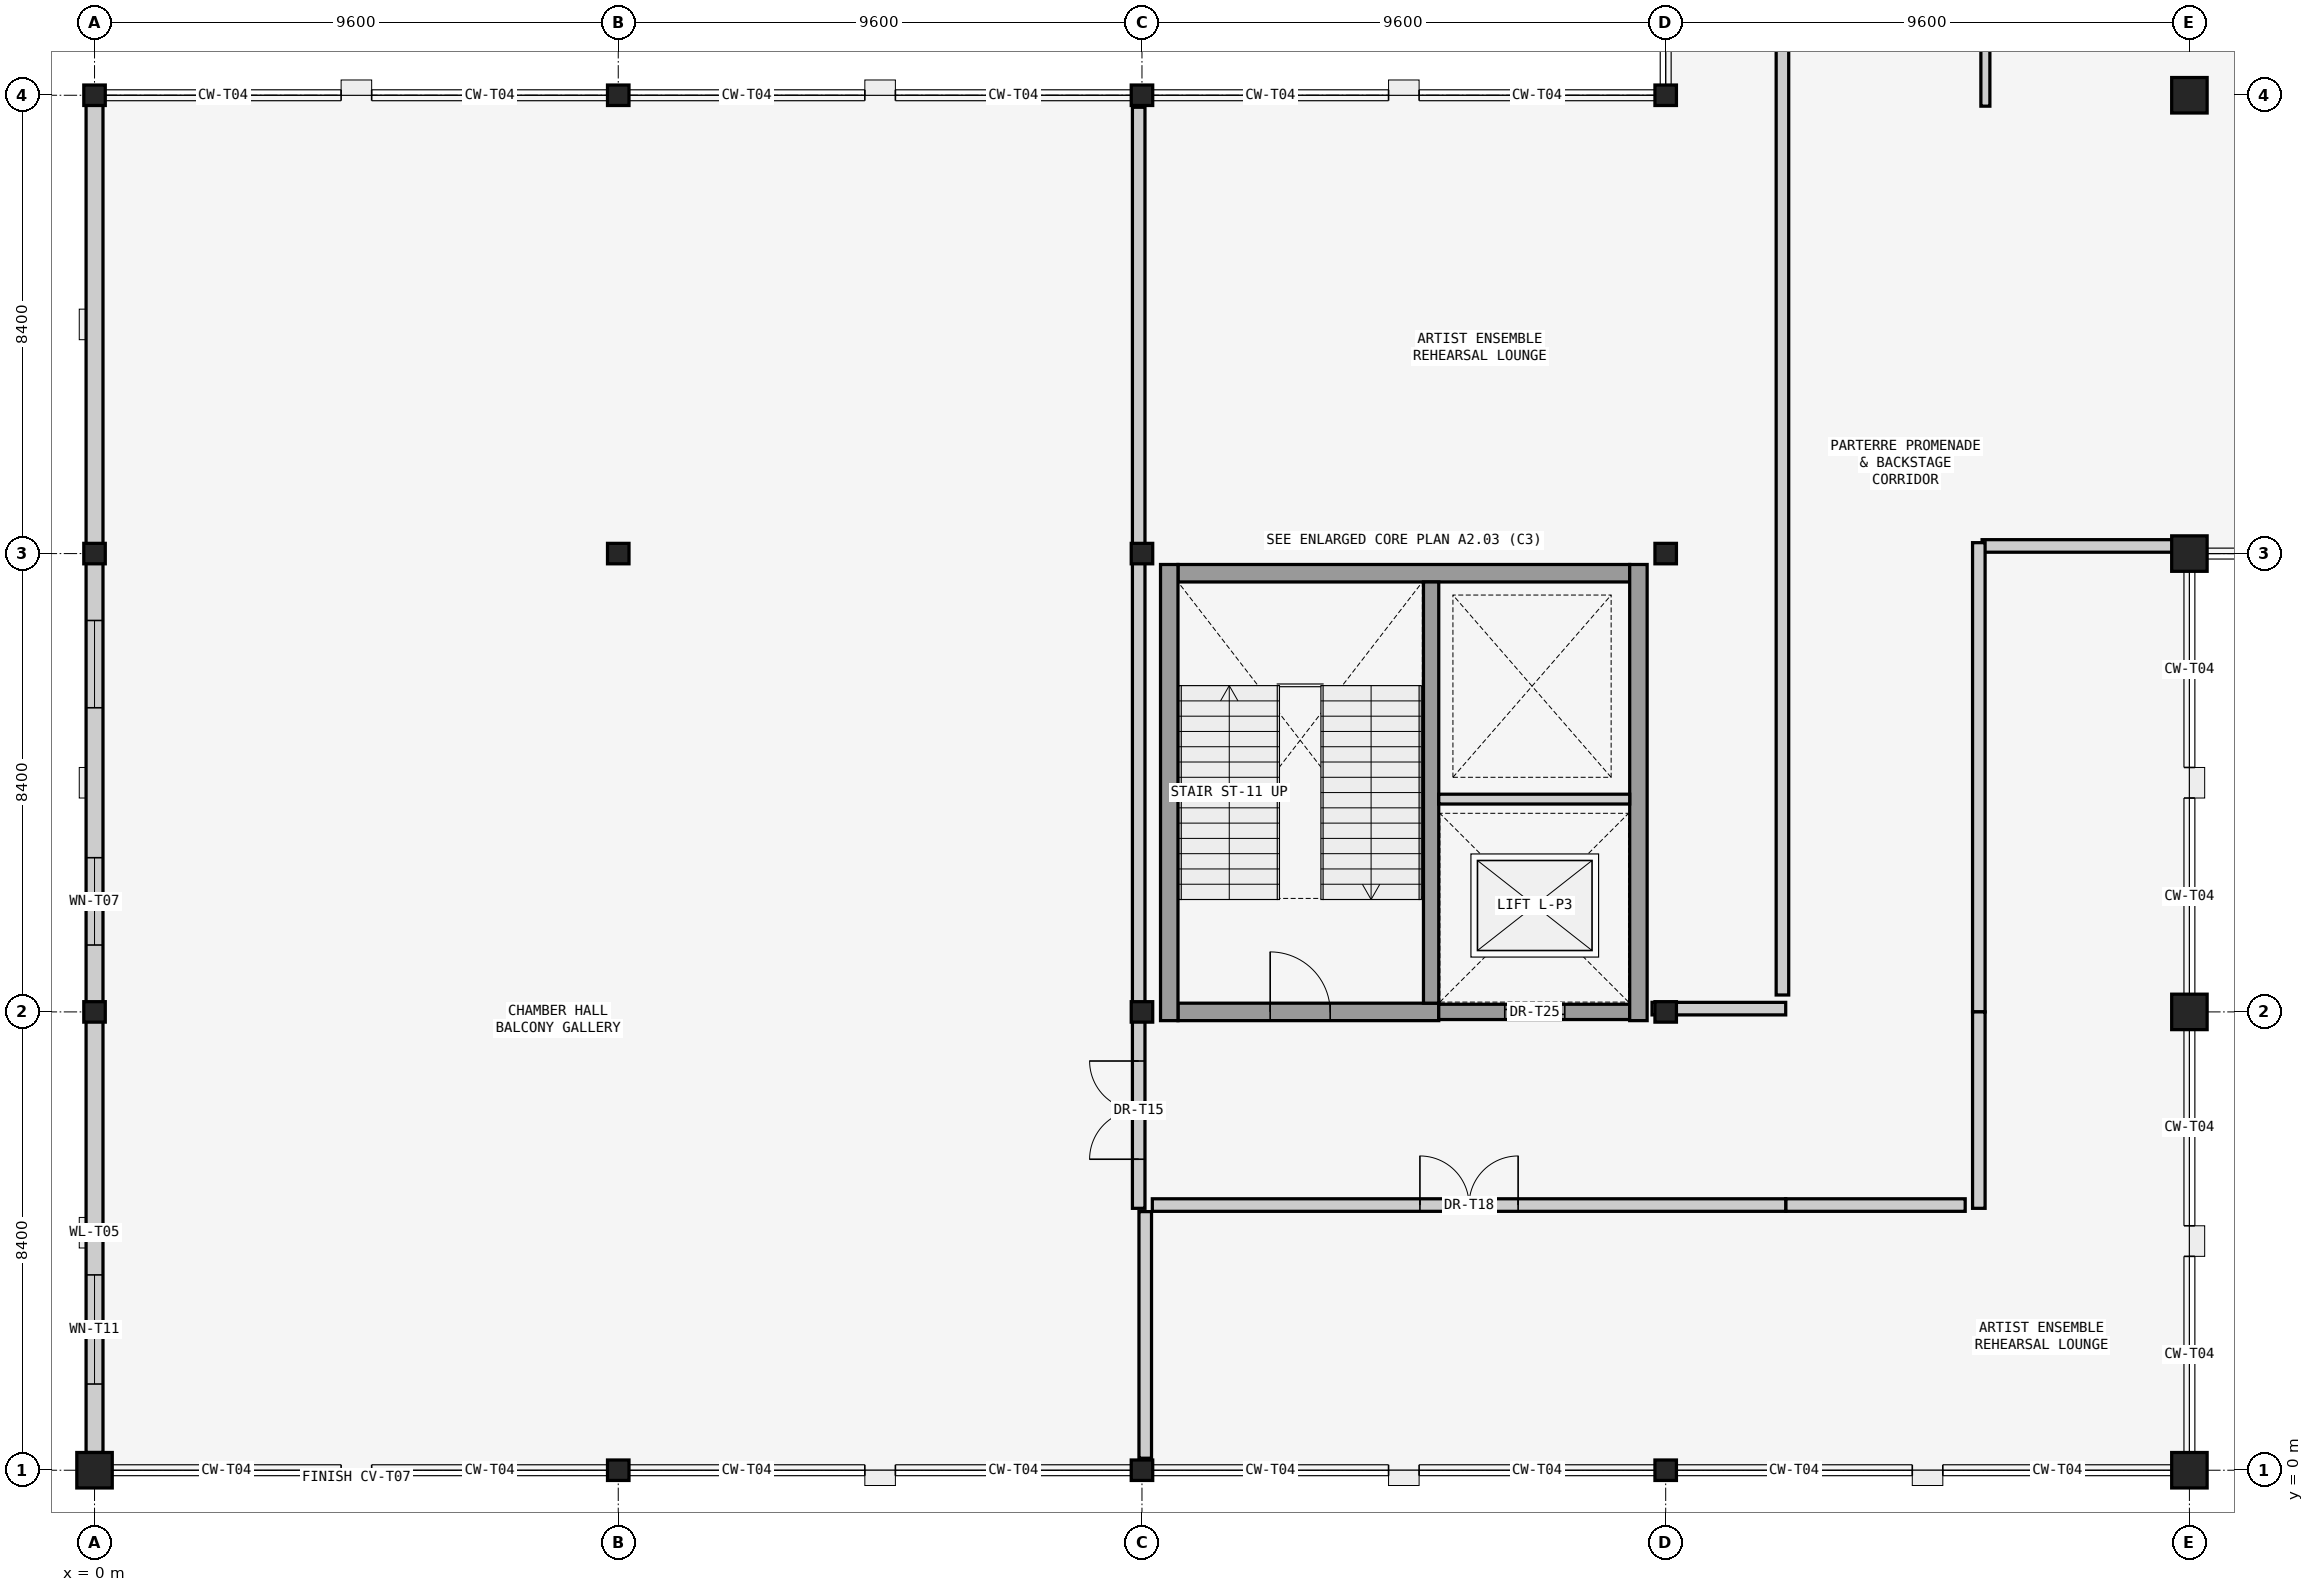
"""IFC4 building model, lengths in metres.
Left out: names, types, materials, properties, quantities, classifications, styles, units other than length and angle.
Written with IfcOpenShell. Run it as: python <this file> out.ifc"""

import sys

from ifc_helpers import new_model, si_unit, direction, frame, frame_2d, origin, origin_with_axes, origin_2d, place, context, subcontext, project, spatial, rectangle, i_section, extrude, element, fill, save


model = new_model("IFC4")
c1 = context("Model", 3, precision=1e-05, world=origin(), true_north=direction((0.0, 1.0)))
c2 = subcontext(c1, "Body", "Model", "MODEL_VIEW")
j1 = project(units=[si_unit("LENGTHUNIT", "METRE"), si_unit("PLANEANGLEUNIT", "RADIAN")], contexts=[c1])
p1 = place(None, origin())
s1 = spatial("IfcSite", under=j1, at=p1, CompositionType="ELEMENT")
p2 = place(p1, origin())
s2 = spatial("IfcBuilding", under=s1, at=p2, CompositionType="ELEMENT")
p3 = place(p2, frame((0.0, 0.0, 5.4)))
s3 = spatial("IfcBuildingStorey", under=s2, at=p3, CompositionType="ELEMENT", Elevation=5.4)
p4 = place(p3, origin_with_axes())
e1 = element("IfcColumn", 1, at=p4, inside=s3, PredefinedType="PILASTER", context=c2, shape_type="SweptSolid", body=[
    extrude(rectangle(XDim=0.65, YDim=0.65, at=origin_2d()), origin(), (0.0, 0.0, 1.0), 4.54),
])
for number, where, z_axis, x_axis in (
    (2, (0.0, 8.4, 0.0), (0.0, 0.0, 1.0), (1.0, 0.0, 0.0)),
    (3, (0.0, 16.8, 0.0), (0.0, 0.0, 1.0), (1.0, 0.0, 0.0)),
    (4, (0.0, 25.2, 0.0), (0.0, 0.0, 1.0), (1.0, 0.0, 0.0)),
    (5, (9.6, 0.0, 0.0), (0.0, 0.0, 1.0), (1.0, 0.0, 0.0)),
    (6, (9.6, 16.8, 0.0), (0.0, 0.0, 1.0), (1.0, 0.0, 0.0)),
    (7, (9.6, 25.2, 0.0), (0.0, 0.0, 1.0), (1.0, 0.0, 0.0)),
    (8, (19.2, 0.0, 0.0), (0.0, 0.0, 1.0), (1.0, 0.0, 0.0)),
    (9, (19.2, 8.4, 0.0), (0.0, 0.0, 1.0), (1.0, 0.0, 0.0)),
    (10, (19.2, 16.8, 0.0), (0.0, 0.0, 1.0), (1.0, 0.0, 0.0)),
    (11, (19.2, 25.2, 0.0), (0.0, 0.0, 1.0), (1.0, 0.0, 0.0)),
    (12, (28.8, 0.0, 0.0), (0.0, 0.0, 1.0), (1.0, 0.0, 0.0)),
    (13, (28.8, 8.4, 0.0), (0.0, 0.0, 1.0), (1.0, 0.0, 0.0)),
    (14, (28.8, 16.8, 0.0), (0.0, 0.0, 1.0), (1.0, 0.0, 0.0)),
):
    element("IfcColumn", number, at=place(p3, frame(where, z_axis=z_axis, x_axis=x_axis)), inside=s3, PredefinedType="COLUMN", context=c2, shape_type="SweptSolid", body=[
        extrude(i_section(OverallWidth=0.394, OverallDepth=0.375, WebThickness=0.021, FlangeThickness=0.033, at=origin_2d()), origin(), (0.0, 0.0, 1.0), 4.54),
    ])
p5 = place(p3, frame((28.8, 25.2, 0.0), z_axis=(0.0, 0.0, 1.0), x_axis=(1.0, 0.0, 0.0)))
e15 = element("IfcColumn", 15, at=p5, inside=s3, PredefinedType="COLUMN", context=c2, shape_type="SweptSolid", body=[
    extrude(i_section(OverallWidth=0.394, OverallDepth=0.375, WebThickness=0.021, FlangeThickness=0.033, at=origin_2d()), origin(), (0.0, 0.0, 1.0), 4.53),
])
for number, where, z_axis, x_axis in (
    (16, (38.4, 0.0, 0.0), (0.0, 0.0, 1.0), (1.0, 0.0, 0.0)),
    (17, (38.4, 8.4, 0.0), (0.0, 0.0, 1.0), (1.0, 0.0, 0.0)),
    (18, (38.4, 16.8, 0.0), (0.0, 0.0, 1.0), (1.0, 0.0, 0.0)),
):
    element("IfcColumn", number, at=place(p3, frame(where, z_axis=z_axis, x_axis=x_axis)), inside=s3, PredefinedType="COLUMN", context=c2, shape_type="SweptSolid", body=[
        extrude(rectangle(XDim=0.65, YDim=0.65, at=origin_2d()), origin(), (0.0, 0.0, 1.0), 4.54),
    ])
p6 = place(p3, frame((38.4, 25.2, 0.0), z_axis=(0.0, 0.0, 1.0), x_axis=(1.0, 0.0, 0.0)))
e19 = element("IfcColumn", 19, at=p6, inside=s3, PredefinedType="COLUMN", context=c2, shape_type="SweptSolid", body=[
    extrude(rectangle(XDim=0.65, YDim=0.65, at=origin_2d()), origin(), (0.0, 0.0, 1.0), 4.53),
])
p7 = place(p3, frame((0.0, 0.325, 0.0), z_axis=(0.0, 0.0, 1.0), x_axis=(0.0, 1.0, 0.0)))
e20 = element("IfcWall", 20, at=p7, inside=s3, PredefinedType="SOLIDWALL", context=c2, shape_type="SweptSolid", body=[
    extrude(rectangle(XDim=8.055, YDim=0.31, at=frame_2d((4.027, 0.0))), origin(), (0.0, 0.0, 1.0), 3.92),
])
p8 = place(p7, frame((1.255, 0.0, 1.05)))
e21 = element("IfcOpeningElement", 21, at=p8, cuts=e20, PredefinedType="OPENING", context=c2, shape_type="SweptSolid", body=[
    extrude(rectangle(XDim=2.0, YDim=1.5, at=frame_2d((1.0, 0.75))), frame((0.0, 0.165, 0.0), z_axis=(0.0, -1.0, 0.0), x_axis=(1.0, 0.0, 0.0)), (0.0, 0.0, 1.0), 0.33),
])
p9 = place(p3, frame((0.0, 8.42, 0.0), z_axis=(0.0, 0.0, 1.0), x_axis=(0.0, 1.0, 0.0)))
e22 = element("IfcWall", 22, at=p9, inside=s3, PredefinedType="SOLIDWALL", context=c2, shape_type="SweptSolid", body=[
    extrude(rectangle(XDim=8.36, YDim=0.31, at=frame_2d((4.18, 0.0))), origin(), (0.0, 0.0, 1.0), 3.92),
])
p10 = place(p9, frame((1.206, 0.0, 0.99)))
e23 = element("IfcOpeningElement", 23, at=p10, cuts=e22, PredefinedType="OPENING", context=c2, shape_type="SweptSolid", body=[
    extrude(rectangle(XDim=1.6, YDim=2.0, at=frame_2d((0.8, 1.0))), frame((0.0, 0.165, 0.0), z_axis=(0.0, -1.0, 0.0), x_axis=(1.0, 0.0, 0.0)), (0.0, 0.0, 1.0), 0.33),
])
p11 = place(p9, frame((5.554, 0.0, 0.99)))
e24 = element("IfcOpeningElement", 24, at=p11, cuts=e22, PredefinedType="OPENING", context=c2, shape_type="SweptSolid", body=[
    extrude(rectangle(XDim=1.6, YDim=2.0, at=frame_2d((0.8, 1.0))), frame((0.0, 0.165, 0.0), z_axis=(0.0, -1.0, 0.0), x_axis=(1.0, 0.0, 0.0)), (0.0, 0.0, 1.0), 0.33),
])
p12 = place(p3, frame((0.0, 16.82, 0.0), z_axis=(0.0, 0.0, 1.0), x_axis=(0.0, 1.0, 0.0)))
e25 = element("IfcWall", 25, at=p12, inside=s3, PredefinedType="SOLIDWALL", context=c2, shape_type="SweptSolid", body=[
    extrude(rectangle(XDim=8.36, YDim=0.31, at=frame_2d((4.18, 0.0))), origin(), (0.0, 0.0, 1.0), 3.92),
])
p13 = place(p3, frame((19.86, 8.4, 0.0), z_axis=(0.0, 0.0, 1.0), x_axis=(1.0, 0.0, 0.0)))
e26 = element("IfcWall", 26, at=p13, inside=s3, PredefinedType="SHEAR", context=c2, shape_type="SweptSolid", body=[
    extrude(rectangle(XDim=4.78, YDim=0.32, at=frame_2d((2.39, 0.0))), origin(), (0.0, 0.0, 1.0), 4.52),
])
p14 = place(p13, frame((1.69, 0.0, 0.0)))
e27 = element("IfcOpeningElement", 27, at=p14, cuts=e26, PredefinedType="OPENING", context=c2, shape_type="SweptSolid", body=[
    extrude(rectangle(XDim=1.1, YDim=2.2, at=frame_2d((0.55, 1.1))), frame((0.0, 0.17, 0.0), z_axis=(0.0, -1.0, 0.0), x_axis=(1.0, 0.0, 0.0)), (0.0, 0.0, 1.0), 0.34),
])
p15 = place(p3, frame((24.64, 8.4, 0.0), z_axis=(0.0, 0.0, 1.0), x_axis=(1.0, 0.0, 0.0)))
e28 = element("IfcWall", 28, at=p15, inside=s3, PredefinedType="SHEAR", context=c2, shape_type="SweptSolid", body=[
    extrude(rectangle(XDim=3.5, YDim=0.28, at=frame_2d((1.75, 0.0))), origin(), (0.0, 0.0, 1.0), 4.52),
])
p16 = place(p15, frame((1.21, 0.0, 0.0)))
e29 = element("IfcOpeningElement", 29, at=p16, cuts=e28, PredefinedType="OPENING", context=c2, shape_type="SweptSolid", body=[
    extrude(rectangle(XDim=1.1, YDim=2.2, at=frame_2d((0.55, 1.1))), frame((0.0, 0.15, 0.0), z_axis=(0.0, -1.0, 0.0), x_axis=(1.0, 0.0, 0.0)), (0.0, 0.0, 1.0), 0.3),
])
p17 = place(p3, frame((28.14, 16.44, 0.0), z_axis=(0.0, 0.0, 1.0), x_axis=(-1.0, 0.0, 0.0)))
e30 = element("IfcWall", 30, at=p17, inside=s3, PredefinedType="SHEAR", context=c2, shape_type="SweptSolid", body=[
    extrude(rectangle(XDim=8.28, YDim=0.32, at=frame_2d((4.14, 0.0))), origin(), (0.0, 0.0, 1.0), 4.52),
])
for number, where, z_axis, x_axis in (
    (31, (19.7, 16.6, 0.0), (0.0, 0.0, 1.0), (0.0, -1.0, 0.0)),
    (32, (28.3, 8.24, 0.0), (0.0, 0.0, 1.0), (0.0, 1.0, 0.0)),
):
    element("IfcWall", number, at=place(p3, frame(where, z_axis=z_axis, x_axis=x_axis)), inside=s3, PredefinedType="SHEAR", context=c2, shape_type="SweptSolid", body=[
        extrude(rectangle(XDim=8.36, YDim=0.32, at=frame_2d((4.18, 0.0))), origin(), (0.0, 0.0, 1.0), 4.52),
    ])
p18 = place(p3, frame((24.5, 8.56, 0.0), z_axis=(0.0, 0.0, 1.0), x_axis=(0.0, 1.0, 0.0)))
e33 = element("IfcWall", 33, at=p18, inside=s3, PredefinedType="SHEAR", context=c2, shape_type="SweptSolid", body=[
    extrude(rectangle(XDim=7.72, YDim=0.28, at=frame_2d((3.86, 0.0))), origin(), (0.0, 0.0, 1.0), 4.52),
])
p19 = place(p3, frame((24.64, 12.3, 0.0), z_axis=(0.0, 0.0, 1.0), x_axis=(1.0, 0.0, 0.0)))
e34 = element("IfcWall", 34, at=p19, inside=s3, PredefinedType="SOLIDWALL", context=c2, shape_type="SweptSolid", body=[
    extrude(rectangle(XDim=3.5, YDim=0.18, at=frame_2d((1.75, 0.0))), origin(), (0.0, 0.0, 1.0), 4.52),
])
p20 = place(p3, frame((34.66, 25.0, 0.0), z_axis=(0.0, 0.0, 1.0), x_axis=(0.0, 1.0, 0.0)))
e35 = element("IfcWall", 35, at=p20, inside=s3, PredefinedType="PARTITIONING", context=c2, shape_type="SweptSolid", body=[
    extrude(rectangle(XDim=17.2, YDim=0.165, at=frame_2d((8.6, 0.0))), origin(), (0.0, 0.0, 1.0), 4.48),
])
p21 = place(p20, frame((8.125, 0.0, 0.0)))
e36 = element("IfcOpeningElement", 36, at=p21, cuts=e35, PredefinedType="OPENING", context=c2, shape_type="SweptSolid", body=[
    extrude(rectangle(XDim=0.95, YDim=2.15, at=frame_2d((0.475, 1.075))), frame((0.0, 0.093, 0.0), z_axis=(0.0, -1.0, 0.0), x_axis=(1.0, 0.0, 0.0)), (0.0, 0.0, 1.0), 0.185),
])
p22 = place(p3, frame((19.14, 4.8, 0.0), z_axis=(0.0, 0.0, 1.0), x_axis=(0.0, 1.0, 0.0)))
e37 = element("IfcWall", 37, at=p22, inside=s3, PredefinedType="SOLIDWALL", context=c2, shape_type="SweptSolid", body=[
    extrude(rectangle(XDim=3.6, YDim=0.23, at=frame_2d((1.8, 0.0))), origin(), (0.0, 0.0, 1.0), 3.82),
])
p23 = place(p22, frame((0.9, 0.0, 0.0)))
e38 = element("IfcOpeningElement", 38, at=p23, cuts=e37, PredefinedType="OPENING", context=c2, shape_type="SweptSolid", body=[
    extrude(rectangle(XDim=1.8, YDim=2.3, at=frame_2d((0.9, 1.15))), frame((0.0, 0.125, 0.0), z_axis=(0.0, -1.0, 0.0), x_axis=(1.0, 0.0, 0.0)), (0.0, 0.0, 1.0), 0.25),
])
p24 = place(p3, frame((28.55, 8.46, 0.0), z_axis=(0.0, 0.0, 1.0), x_axis=(1.0, 0.0, 0.0)))
e39 = element("IfcWall", 39, at=p24, inside=s3, PredefinedType="SOLIDWALL", context=c2, shape_type="SweptSolid", body=[
    extrude(rectangle(XDim=2.45, YDim=0.23, at=frame_2d((1.225, 0.0))), origin(), (0.0, 0.0, 1.0), 3.57),
])
p25 = place(p3, frame((30.94, 8.71, 0.0), z_axis=(0.0, 0.0, 1.0), x_axis=(0.0, 1.0, 0.0)))
e40 = element("IfcWall", 40, at=p25, inside=s3, PredefinedType="SOLIDWALL", context=c2, shape_type="SweptSolid", body=[
    extrude(rectangle(XDim=71.69, YDim=0.23, at=frame_2d((35.845, 0.0))), origin(), (0.0, 0.0, 1.0), 4.48),
])
p26 = place(p25, frame((34.945, 0.0, 0.0)))
e41 = element("IfcOpeningElement", 41, at=p26, cuts=e40, PredefinedType="OPENING", context=c2, shape_type="SweptSolid", body=[
    extrude(rectangle(XDim=1.8, YDim=2.4, at=frame_2d((0.9, 1.2))), frame((0.0, 0.125, 0.0), z_axis=(0.0, -1.0, 0.0), x_axis=(1.0, 0.0, 0.0)), (0.0, 0.0, 1.0), 0.25),
])
p27 = place(p3, frame((34.6, 16.94, 0.0), z_axis=(0.0, 0.0, 1.0), x_axis=(1.0, 0.0, 0.0)))
e42 = element("IfcWall", 42, at=p27, inside=s3, PredefinedType="SOLIDWALL", context=c2, shape_type="SweptSolid", body=[
    extrude(rectangle(XDim=3.709, YDim=0.23, at=frame_2d((1.854, 0.0))), origin(), (0.0, 0.0, 1.0), 3.67),
])
p28 = place(p3, frame((34.54, 8.4, 0.0), z_axis=(0.0, 0.0, 1.0), x_axis=(0.0, 1.0, 0.0)))
e43 = element("IfcWall", 43, at=p28, inside=s3, PredefinedType="SOLIDWALL", context=c2, shape_type="SweptSolid", body=[
    extrude(rectangle(XDim=8.6, YDim=0.23, at=frame_2d((4.3, 0.0))), origin(), (0.0, 0.0, 1.0), 4.48),
])
p29 = place(p3, frame((34.54, 4.8, 0.0), z_axis=(0.0, 0.0, 1.0), x_axis=(0.0, 1.0, 0.0)))
e44 = element("IfcWall", 44, at=p29, inside=s3, PredefinedType="SOLIDWALL", context=c2, shape_type="SweptSolid", body=[
    extrude(rectangle(XDim=3.6, YDim=0.23, at=frame_2d((1.8, 0.0))), origin(), (0.0, 0.0, 1.0), 4.48),
])
p30 = place(p3, frame((31.0, 4.86, 0.0), z_axis=(0.0, 0.0, 1.0), x_axis=(1.0, 0.0, 0.0)))
e45 = element("IfcWall", 45, at=p30, inside=s3, PredefinedType="SOLIDWALL", context=c2, shape_type="SweptSolid", body=[
    extrude(rectangle(XDim=3.29, YDim=0.23, at=frame_2d((1.645, 0.0))), origin(), (0.0, 0.0, 1.0), 4.48),
])
p31 = place(p3, frame((19.39, 4.86, 0.0), z_axis=(0.0, 0.0, 1.0), x_axis=(1.0, 0.0, 0.0)))
e46 = element("IfcWall", 46, at=p31, inside=s3, PredefinedType="SOLIDWALL", context=c2, shape_type="SweptSolid", body=[
    extrude(rectangle(XDim=11.61, YDim=0.23, at=frame_2d((5.805, 0.0))), origin(), (0.0, 0.0, 1.0), 4.48),
])
p32 = place(p31, frame((4.905, 0.0, 0.0)))
e47 = element("IfcOpeningElement", 47, at=p32, cuts=e46, PredefinedType="OPENING", context=c2, shape_type="SweptSolid", body=[
    extrude(rectangle(XDim=1.8, YDim=2.4, at=frame_2d((0.9, 1.2))), frame((0.0, 0.125, 0.0), z_axis=(0.0, -1.0, 0.0), x_axis=(1.0, 0.0, 0.0)), (0.0, 0.0, 1.0), 0.25),
])
p33 = place(p3, frame((19.14, 8.46, 0.0), z_axis=(0.0, 0.0, 1.0), x_axis=(0.0, 1.0, 0.0)))
e48 = element("IfcWall", 48, at=p33, inside=s3, PredefinedType="SOLIDWALL", context=c2, shape_type="SweptSolid", body=[
    extrude(rectangle(XDim=16.52, YDim=0.23, at=frame_2d((8.26, 0.0))), origin(), (0.0, 0.0, 1.0), 3.82),
])
p34 = place(p3, frame((19.26, 0.22, 0.0), z_axis=(0.0, 0.0, 1.0), x_axis=(0.0, 1.0, 0.0)))
e49 = element("IfcWall", 49, at=p34, inside=s3, PredefinedType="SOLIDWALL", context=c2, shape_type="SweptSolid", body=[
    extrude(rectangle(XDim=4.52, YDim=0.23, at=frame_2d((2.26, 0.0))), origin(), (0.0, 0.0, 1.0), 3.82),
])
p35 = place(p8, origin())
e50 = element("IfcWindow", 50, at=p35, inside=s3, PartitioningType="SINGLE_PANEL", PredefinedType="WINDOW", context=c2, shape_type="SweptSolid", body=[
    extrude(rectangle(XDim=2.0, YDim=1.5, at=frame_2d((1.0, 0.75))), frame((0.0, 0.03, 0.0), z_axis=(0.0, -1.0, 0.0), x_axis=(1.0, 0.0, 0.0)), (0.0, 0.0, 1.0), 0.06),
])
fill(e21, e50)
p36 = place(p10, origin())
e51 = element("IfcWindow", 51, at=p36, inside=s3, PartitioningType="SINGLE_PANEL", PredefinedType="WINDOW", context=c2, shape_type="SweptSolid", body=[
    extrude(rectangle(XDim=1.6, YDim=2.0, at=frame_2d((0.8, 1.0))), frame((0.0, 0.03, 0.0), z_axis=(0.0, -1.0, 0.0), x_axis=(1.0, 0.0, 0.0)), (0.0, 0.0, 1.0), 0.06),
])
fill(e23, e51)
p37 = place(p11, origin())
e52 = element("IfcWindow", 52, at=p37, inside=s3, PartitioningType="SINGLE_PANEL", PredefinedType="WINDOW", context=c2, shape_type="SweptSolid", body=[
    extrude(rectangle(XDim=1.6, YDim=2.0, at=frame_2d((0.8, 1.0))), frame((0.0, 0.03, 0.0), z_axis=(0.0, -1.0, 0.0), x_axis=(1.0, 0.0, 0.0)), (0.0, 0.0, 1.0), 0.06),
])
fill(e24, e52)
p38 = place(p14, origin())
e53 = element("IfcDoor", 53, at=p38, inside=s3, OperationType="SINGLE_SWING_LEFT", PredefinedType="DOOR", context=c2, shape_type="SweptSolid", body=[
    extrude(rectangle(XDim=1.1, YDim=2.2, at=frame_2d((0.55, 1.1))), frame((0.0, 0.025, 0.0), z_axis=(0.0, -1.0, 0.0), x_axis=(1.0, 0.0, 0.0)), (0.0, 0.0, 1.0), 0.05),
])
fill(e27, e53)
p39 = place(p16, origin())
e54 = element("IfcDoor", 54, at=p39, inside=s3, OperationType="SLIDING_TO_LEFT", PredefinedType="DOOR", context=c2, shape_type="SweptSolid", body=[
    extrude(rectangle(XDim=1.1, YDim=2.2, at=frame_2d((0.55, 1.1))), frame((0.0, 0.025, 0.0), z_axis=(0.0, -1.0, 0.0), x_axis=(1.0, 0.0, 0.0)), (0.0, 0.0, 1.0), 0.05),
])
fill(e29, e54)
p40 = place(p23, origin())
e55 = element("IfcDoor", 55, at=p40, inside=s3, OperationType="DOUBLE_SWING_LEFT", PredefinedType="DOOR", context=c2, shape_type="SweptSolid", body=[
    extrude(rectangle(XDim=1.8, YDim=2.3, at=frame_2d((0.9, 1.15))), frame((0.0, 0.025, 0.0), z_axis=(0.0, -1.0, 0.0), x_axis=(1.0, 0.0, 0.0)), (0.0, 0.0, 1.0), 0.05),
])
fill(e38, e55)
p41 = place(p32, origin())
e56 = element("IfcDoor", 56, at=p41, inside=s3, OperationType="DOUBLE_SWING_LEFT", PredefinedType="DOOR", context=c2, shape_type="SweptSolid", body=[
    extrude(rectangle(XDim=1.8, YDim=2.4, at=frame_2d((0.9, 1.2))), frame((0.0, 0.025, 0.0), z_axis=(0.0, -1.0, 0.0), x_axis=(1.0, 0.0, 0.0)), (0.0, 0.0, 1.0), 0.05),
])
fill(e47, e56)
save(model, sys.argv[1])
